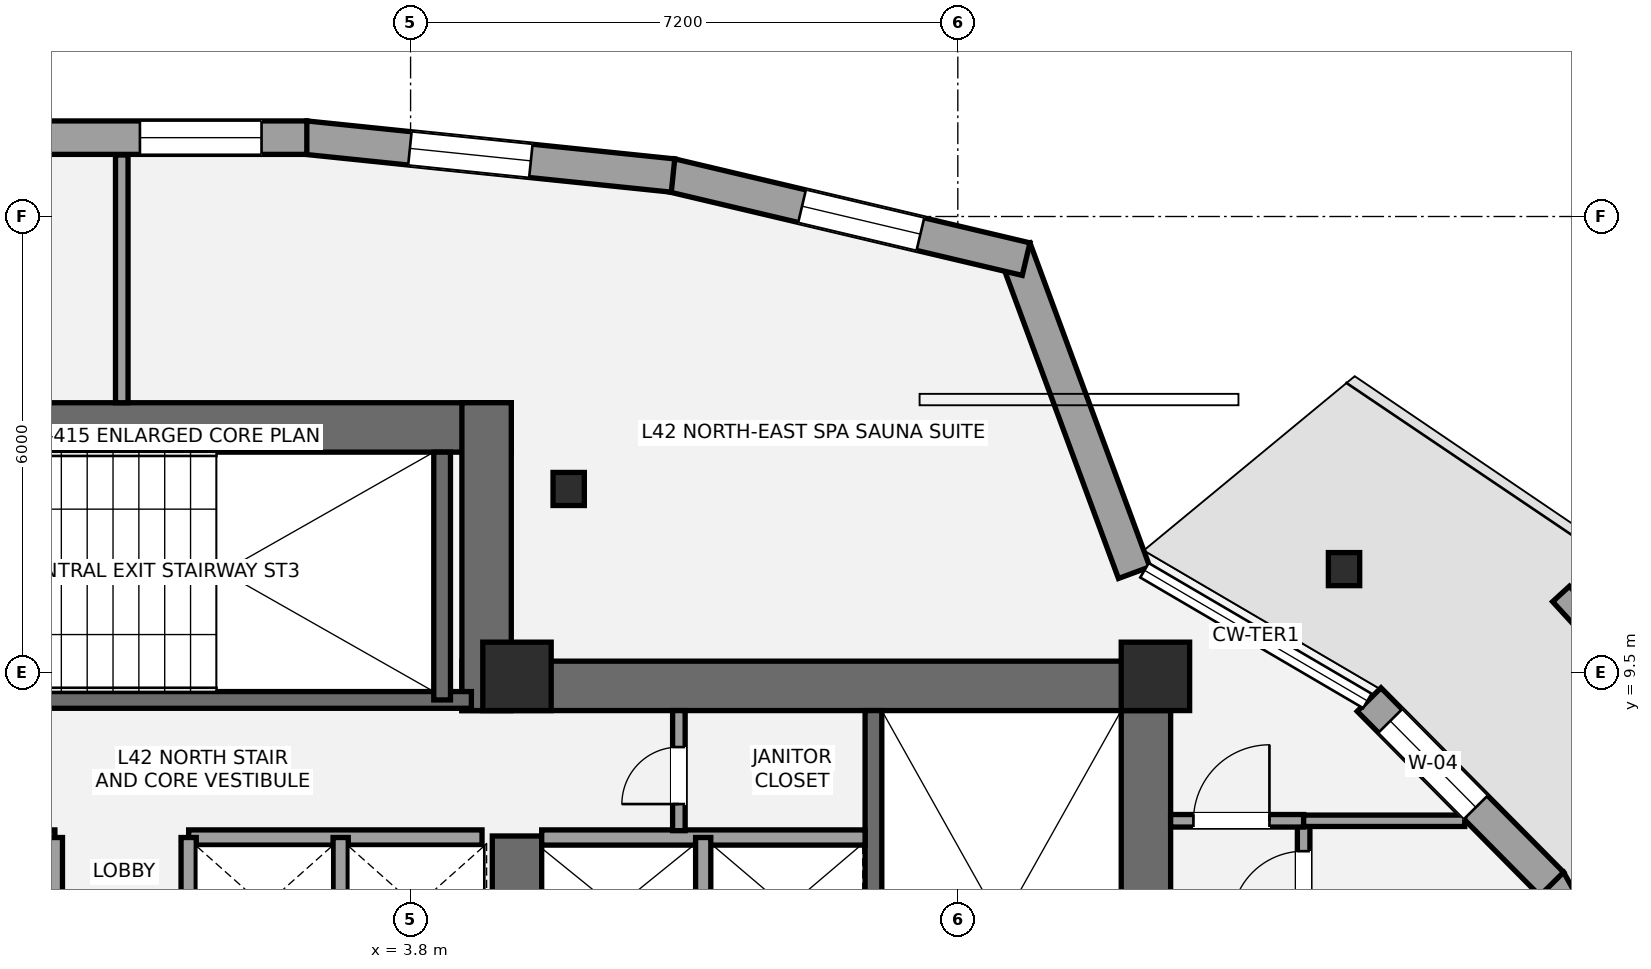
"""IFC4 building model, lengths in metres.
Left out: names, types, materials, properties, quantities, classifications, styles, units other than length and angle.
Written with IfcOpenShell. Run it as: python <this file> out.ifc"""

import sys

from ifc_helpers import new_model, si_unit, direction, frame, frame_2d, origin, origin_2d, place, context, subcontext, project, spatial, rectangle, i_section, extrude, element, fill, save


model = new_model("IFC4")
c1 = context("Model", 3, precision=1e-05, world=origin(), true_north=direction((0.0, 1.0)))
c2 = subcontext(c1, "Body", "Model", "MODEL_VIEW")
j1 = project(units=[si_unit("LENGTHUNIT", "METRE"), si_unit("PLANEANGLEUNIT", "RADIAN")], contexts=[c1])
p1 = place(None, origin())
s1 = spatial("IfcSite", under=j1, at=p1, CompositionType="ELEMENT")
p2 = place(p1, origin())
s2 = spatial("IfcBuilding", under=s1, at=p2, CompositionType="ELEMENT")
p3 = place(p2, frame((0.0, 0.0, 156.6)))
s3 = spatial("IfcBuildingStorey", under=s2, at=p3, CompositionType="ELEMENT", Elevation=156.6)
p4 = place(p3, frame((13.475, 1.2, 0.0), z_axis=(0.0, 0.0, 1.0), x_axis=(0.0, 1.0, 0.0)))
e1 = element("IfcWall", 1, at=p4, inside=s3, PredefinedType="SHEAR", context=c2, shape_type="SweptSolid", body=[
    extrude(rectangle(XDim=8.45, YDim=0.65, at=frame_2d((4.225, 0.0))), origin(), (0.0, 0.0, 1.0), 3.2),
])
p5 = place(p3, frame((4.475, 9.325, 0.0), z_axis=(0.0, 0.0, 1.0), x_axis=(1.0, 0.0, 0.0)))
e2 = element("IfcWall", 2, at=p5, inside=s3, PredefinedType="SHEAR", context=c2, shape_type="SweptSolid", body=[
    extrude(rectangle(XDim=9.325, YDim=0.65, at=frame_2d((4.663, 0.0))), origin(), (0.0, 0.0, 1.0), 3.2),
])
p6 = place(p3, frame((5.2, 5.35, 0.0), z_axis=(0.0, 0.0, 1.0), x_axis=(0.0, 1.0, 0.0)))
e3 = element("IfcWall", 3, at=p6, inside=s3, PredefinedType="SHEAR", context=c2, shape_type="SweptSolid", body=[
    extrude(rectangle(XDim=2.0, YDim=0.65, at=frame_2d((1.0, 0.0))), origin(), (0.0, 0.0, 1.0), 3.2),
])
p7 = place(p3, frame((9.89, 1.85, 0.0), z_axis=(0.0, 0.0, 1.0), x_axis=(0.0, 1.0, 0.0)))
e4 = element("IfcWall", 4, at=p7, inside=s3, PredefinedType="SHEAR", context=c2, shape_type="SweptSolid", body=[
    extrude(rectangle(XDim=7.15, YDim=0.22, at=frame_2d((3.575, 0.0))), origin(), (0.0, 0.0, 1.0), 3.2),
])
p8 = place(p3, frame((-5.125, 12.725, 0.0), z_axis=(0.0, 0.0, 1.0), x_axis=(1.0, 0.0, 0.0)))
e5 = element("IfcWall", 5, at=p8, inside=s3, PredefinedType="SHEAR", context=c2, shape_type="SweptSolid", body=[
    extrude(rectangle(XDim=10.25, YDim=0.65, at=frame_2d((5.125, 0.0))), origin(), (0.0, 0.0, 1.0), 3.2),
])
p9 = place(p3, frame((4.8, 9.0, 0.0), z_axis=(0.0, 0.0, 1.0), x_axis=(0.0, 1.0, 0.0)))
e6 = element("IfcWall", 6, at=p9, inside=s3, PredefinedType="SHEAR", context=c2, shape_type="SweptSolid", body=[
    extrude(rectangle(XDim=4.05, YDim=0.65, at=frame_2d((2.025, 0.0))), origin(), (0.0, 0.0, 1.0), 3.2),
])
p10 = place(p3, frame((-4.7, 9.14, 0.0), z_axis=(0.0, 0.0, 1.0), x_axis=(1.0, 0.0, 0.0)))
e7 = element("IfcWall", 7, at=p10, inside=s3, PredefinedType="SHEAR", context=c2, shape_type="SweptSolid", body=[
    extrude(rectangle(XDim=9.3, YDim=0.22, at=frame_2d((4.65, 0.0))), origin(), (0.0, 0.0, 1.0), 3.2),
])
p11 = place(p10, frame((1.15, 0.0, 0.0)))
e8 = element("IfcOpeningElement", 8, at=p11, cuts=e7, PredefinedType="OPENING", context=c2, shape_type="SweptSolid", body=[
    extrude(rectangle(XDim=1.05, YDim=2.15, at=frame_2d((0.525, 1.075))), frame((0.0, 0.12, 0.0), z_axis=(0.0, -1.0, 0.0), x_axis=(1.0, 0.0, 0.0)), (0.0, 0.0, 1.0), 0.24),
])
p12 = place(p3, frame((4.215, 9.14, 0.0), z_axis=(0.0, 0.0, 1.0), x_axis=(0.0, 1.0, 0.0)))
e9 = element("IfcWall", 9, at=p12, inside=s3, PredefinedType="SHEAR", context=c2, shape_type="SweptSolid", body=[
    extrude(rectangle(XDim=3.26, YDim=0.22, at=frame_2d((1.63, 0.0))), origin(), (0.0, 0.0, 1.0), 3.2),
])
for number, where, z_axis, x_axis in (
    (10, (5.2, 9.45, 0.0), (0.0, 0.0, 1.0), (1.0, 0.0, 0.0)),
    (11, (13.6, 9.45, 0.0), (0.0, 0.0, 1.0), (1.0, 0.0, 0.0)),
):
    element("IfcColumn", number, at=place(p3, frame(where, z_axis=z_axis, x_axis=x_axis)), inside=s3, PredefinedType="COLUMN", context=c2, shape_type="SweptSolid", body=[
        extrude(rectangle(XDim=0.9, YDim=0.9, at=origin_2d()), origin(), (0.0, 0.0, 1.0), 3.2),
    ])
for number, where, z_axis, x_axis in (
    (12, (16.082, 10.861, 0.0), (0.0, 0.0, 1.0), (1.0, 0.0, 0.0)),
    (13, (5.88, 11.915, 0.0), (0.0, 0.0, 1.0), (1.0, 0.0, 0.0)),
):
    element("IfcColumn", number, at=place(p3, frame(where, z_axis=z_axis, x_axis=x_axis)), inside=s3, PredefinedType="COLUMN", context=c2, shape_type="SweptSolid", body=[
        extrude(i_section(OverallWidth=0.412, OverallDepth=0.435, WebThickness=0.036, FlangeThickness=0.057, at=origin_2d()), origin(), (0.0, 0.0, 1.0), 3.2),
    ])
p13 = place(p3, frame((18.778, 6.766, 0.0), z_axis=(0.0, 0.0, 1.0), x_axis=(0.487244227645, -0.873265745708, 0.0)))
e14 = element("IfcWall", 14, at=p13, inside=s3, PredefinedType="STANDARD", context=c2, shape_type="SweptSolid", body=[
    extrude(rectangle(XDim=3.053, YDim=0.44, at=frame_2d((1.527, 0.0))), origin(), (0.0, 0.0, 1.0), 2.319),
])
p14 = place(p13, frame((0.977, 0.0, 0.0)))
e15 = element("IfcOpeningElement", 15, at=p14, cuts=e14, PredefinedType="OPENING", context=c2, shape_type="SweptSolid", body=[
    extrude(rectangle(XDim=1.1, YDim=2.15, at=frame_2d((0.55, 1.075))), frame((0.0, 0.23, 0.0), z_axis=(0.0, -1.0, 0.0), x_axis=(1.0, 0.0, 0.0)), (0.0, 0.0, 1.0), 0.46),
])
p15 = place(p3, frame((16.412, 9.145, 0.0), z_axis=(0.0, 0.0, 1.0), x_axis=(0.703666281918, -0.71053062122, 0.0)))
e16 = element("IfcWall", 16, at=p15, inside=s3, PredefinedType="STANDARD", context=c2, shape_type="SweptSolid", body=[
    extrude(rectangle(XDim=3.414, YDim=0.44, at=frame_2d((1.707, 0.0))), origin(), (0.0, 0.0, 1.0), 2.319),
])
p16 = place(p15, frame((0.395, 0.0, 0.58)))
e17 = element("IfcOpeningElement", 17, at=p16, cuts=e16, PredefinedType="OPENING", context=c2, shape_type="SweptSolid", body=[
    extrude(rectangle(XDim=1.6, YDim=1.55, at=frame_2d((0.8, 0.775))), frame((0.0, 0.23, 0.0), z_axis=(0.0, -1.0, 0.0), x_axis=(1.0, 0.0, 0.0)), (0.0, 0.0, 1.0), 0.46),
])
p17 = place(p3, frame((11.743, 15.077, 0.0), z_axis=(0.0, 0.0, 1.0), x_axis=(0.347029196507, -0.937854325987, 0.0)))
e18 = element("IfcWall", 18, at=p17, inside=s3, PredefinedType="STANDARD", context=c2, shape_type="SweptSolid", body=[
    extrude(rectangle(XDim=4.545, YDim=0.44, at=frame_2d((2.273, 0.0))), origin(), (0.0, 0.0, 1.0), 2.315),
])
p18 = place(p3, frame((7.225, 16.044, 0.0), z_axis=(0.0, 0.0, 1.0), x_axis=(0.973201371538, -0.229954539936, 0.0)))
e19 = element("IfcWall", 19, at=p18, inside=s3, PredefinedType="STANDARD", context=c2, shape_type="SweptSolid", body=[
    extrude(rectangle(XDim=4.802, YDim=0.44, at=frame_2d((2.401, 0.0))), origin(), (0.0, 0.0, 1.0), 2.315),
])
p19 = place(p18, frame((1.773, 0.0, 0.58)))
e20 = element("IfcOpeningElement", 20, at=p19, cuts=e19, PredefinedType="OPENING", context=c2, shape_type="SweptSolid", body=[
    extrude(rectangle(XDim=1.6, YDim=1.55, at=frame_2d((0.8, 0.775))), frame((0.0, 0.23, 0.0), z_axis=(0.0, -1.0, 0.0), x_axis=(1.0, 0.0, 0.0)), (0.0, 0.0, 1.0), 0.46),
])
p20 = place(p3, frame((2.412, 16.539, 0.0), z_axis=(0.0, 0.0, 1.0), x_axis=(0.994718319881, -0.10264240884, 0.0)))
e21 = element("IfcWall", 21, at=p20, inside=s3, PredefinedType="STANDARD", context=c2, shape_type="SweptSolid", body=[
    extrude(rectangle(XDim=4.866, YDim=0.44, at=frame_2d((2.433, 0.0))), origin(), (0.0, 0.0, 1.0), 2.315),
])
p21 = place(p20, frame((1.386, 0.0, 0.58)))
e22 = element("IfcOpeningElement", 22, at=p21, cuts=e21, PredefinedType="OPENING", context=c2, shape_type="SweptSolid", body=[
    extrude(rectangle(XDim=1.6, YDim=1.55, at=frame_2d((0.8, 0.775))), frame((0.0, 0.23, 0.0), z_axis=(0.0, -1.0, 0.0), x_axis=(1.0, 0.0, 0.0)), (0.0, 0.0, 1.0), 0.46),
])
p22 = place(p3, frame((-2.435, 16.537, 0.0), z_axis=(0.0, 0.0, 1.0), x_axis=(1.0, 0.0, 0.0)))
e23 = element("IfcWall", 23, at=p22, inside=s3, PredefinedType="STANDARD", context=c2, shape_type="SweptSolid", body=[
    extrude(rectangle(XDim=4.87, YDim=0.44, at=frame_2d((2.435, 0.0))), origin(), (0.0, 0.0, 1.0), 2.315),
])
p23 = place(p22, frame((2.674, 0.0, 0.58)))
e24 = element("IfcOpeningElement", 24, at=p23, cuts=e23, PredefinedType="OPENING", context=c2, shape_type="SweptSolid", body=[
    extrude(rectangle(XDim=1.6, YDim=1.55, at=frame_2d((0.8, 0.775))), frame((0.0, 0.23, 0.0), z_axis=(0.0, -1.0, 0.0), x_axis=(1.0, 0.0, 0.0)), (0.0, 0.0, 1.0), 0.46),
])
p24 = place(p3, frame((21.462, 7.776, 0.0), z_axis=(0.0, 0.0, 1.0), x_axis=(-0.675281078683, 0.737560482112, 0.0)))
e25 = element("IfcWall", 25, at=p24, inside=s3, PredefinedType="PARAPET", context=c2, shape_type="SweptSolid", body=[
    extrude(rectangle(XDim=3.74, YDim=0.3, at=frame_2d((1.87, 0.0))), origin(), (0.0, 0.0, 1.0), 0.45),
])
p25 = place(p3, frame((5.525, 7.33, 0.0), z_axis=(0.0, 0.0, 1.0), x_axis=(1.0, 0.0, 0.0)))
e26 = element("IfcWall", 26, at=p25, inside=s3, PredefinedType="SOLIDWALL", context=c2, shape_type="SweptSolid", body=[
    extrude(rectangle(XDim=4.255, YDim=0.2, at=frame_2d((2.127, 0.0))), origin(), (0.0, 0.0, 1.0), 3.02),
])
p26 = place(p3, frame((7.65, 5.47, 0.0), z_axis=(0.0, 0.0, 1.0), x_axis=(0.0, 1.0, 0.0)))
e27 = element("IfcWall", 27, at=p26, inside=s3, PredefinedType="SOLIDWALL", context=c2, shape_type="SweptSolid", body=[
    extrude(rectangle(XDim=1.86, YDim=0.2, at=frame_2d((0.93, 0.0))), origin(), (0.0, 0.0, 1.0), 3.02),
])
for number, where, z_axis, x_axis in (
    (28, (-4.74, 7.33, 0.0), (0.0, 0.0, 1.0), (1.0, 0.0, 0.0)),
    (29, (0.88, 7.33, 0.0), (0.0, 0.0, 1.0), (1.0, 0.0, 0.0)),
):
    element("IfcWall", number, at=place(p3, frame(where, z_axis=z_axis, x_axis=x_axis)), inside=s3, PredefinedType="SOLIDWALL", context=c2, shape_type="SweptSolid", body=[
        extrude(rectangle(XDim=3.86, YDim=0.2, at=frame_2d((1.93, 0.0))), origin(), (0.0, 0.0, 1.0), 3.02),
    ])
for number, where, z_axis, x_axis in (
    (30, (2.88, 5.52, 0.0), (0.0, 0.0, 1.0), (0.0, 1.0, 0.0)),
    (31, (-0.88, 5.52, 0.0), (0.0, 0.0, 1.0), (0.0, 1.0, 0.0)),
    (32, (0.88, 5.52, 0.0), (0.0, 0.0, 1.0), (0.0, 1.0, 0.0)),
):
    element("IfcWall", number, at=place(p3, frame(where, z_axis=z_axis, x_axis=x_axis)), inside=s3, PredefinedType="SOLIDWALL", context=c2, shape_type="SweptSolid", body=[
        extrude(rectangle(XDim=1.81, YDim=0.2, at=frame_2d((0.905, 0.0))), origin(), (0.0, 0.0, 1.0), 3.02),
    ])
p27 = place(p3, frame((7.33, 7.42, 0.0), z_axis=(0.0, 0.0, 1.0), x_axis=(0.0, 1.0, 0.0)))
e33 = element("IfcWall", 33, at=p27, inside=s3, PredefinedType="PARTITIONING", context=c2, shape_type="SweptSolid", body=[
    extrude(rectangle(XDim=1.58, YDim=0.165, at=frame_2d((0.79, 0.0))), origin(), (0.0, 0.0, 1.0), 3.02),
])
p28 = place(p27, frame((0.35, 0.0, 0.0)))
e34 = element("IfcOpeningElement", 34, at=p28, cuts=e33, PredefinedType="OPENING", context=c2, shape_type="SweptSolid", body=[
    extrude(rectangle(XDim=0.75, YDim=2.1, at=frame_2d((0.375, 1.05))), frame((0.0, 0.093, 0.0), z_axis=(0.0, -1.0, 0.0), x_axis=(1.0, 0.0, 0.0)), (0.0, 0.0, 1.0), 0.185),
])
p29 = place(p3, frame((15.55, -13.191, 0.0), z_axis=(0.0, 0.0, 1.0), x_axis=(0.0, 1.0, 0.0)))
e35 = element("IfcWall", 35, at=p29, inside=s3, PredefinedType="PARTITIONING", context=c2, shape_type="SweptSolid", body=[
    extrude(rectangle(XDim=20.741, YDim=0.165, at=frame_2d((10.37, 0.0))), origin(), (0.0, 0.0, 1.0), 2.473),
])
p30 = place(p29, frame((5.641, 0.0, 0.0)))
e36 = element("IfcOpeningElement", 36, at=p30, cuts=e35, PredefinedType="OPENING", context=c2, shape_type="SweptSolid", body=[
    extrude(rectangle(XDim=0.85, YDim=2.1, at=frame_2d((0.425, 1.05))), frame((0.0, 0.093, 0.0), z_axis=(0.0, -1.0, 0.0), x_axis=(1.0, 0.0, 0.0)), (0.0, 0.0, 1.0), 0.185),
])
p31 = place(p29, frame((13.641, 0.0, 0.0)))
e37 = element("IfcOpeningElement", 37, at=p31, cuts=e35, PredefinedType="OPENING", context=c2, shape_type="SweptSolid", body=[
    extrude(rectangle(XDim=0.95, YDim=2.15, at=frame_2d((0.475, 1.075))), frame((0.0, 0.093, 0.0), z_axis=(0.0, -1.0, 0.0), x_axis=(1.0, 0.0, 0.0)), (0.0, 0.0, 1.0), 0.185),
])
p32 = place(p29, frame((19.391, 0.0, 0.0)))
e38 = element("IfcOpeningElement", 38, at=p32, cuts=e35, PredefinedType="OPENING", context=c2, shape_type="SweptSolid", body=[
    extrude(rectangle(XDim=0.95, YDim=2.15, at=frame_2d((0.475, 1.075))), frame((0.0, 0.093, 0.0), z_axis=(0.0, -1.0, 0.0), x_axis=(1.0, 0.0, 0.0)), (0.0, 0.0, 1.0), 0.185),
])
p33 = place(p3, frame((13.8, 7.55, 0.0), z_axis=(0.0, 0.0, 1.0), x_axis=(1.0, 0.0, 0.0)))
e39 = element("IfcWall", 39, at=p33, inside=s3, PredefinedType="PARTITIONING", context=c2, shape_type="SweptSolid", body=[
    extrude(rectangle(XDim=1.75, YDim=0.165, at=frame_2d((0.875, 0.0))), origin(), (0.0, 0.0, 1.0), 2.473),
])
p34 = place(p33, frame((0.3, 0.0, 0.0)))
e40 = element("IfcOpeningElement", 40, at=p34, cuts=e39, PredefinedType="OPENING", context=c2, shape_type="SweptSolid", body=[
    extrude(rectangle(XDim=1.0, YDim=2.15, at=frame_2d((0.5, 1.075))), frame((0.0, 0.093, 0.0), z_axis=(0.0, -1.0, 0.0), x_axis=(1.0, 0.0, 0.0)), (0.0, 0.0, 1.0), 0.185),
])
p35 = place(p3, frame((15.55, 7.55, 0.0), z_axis=(0.0, 0.0, 1.0), x_axis=(1.0, 0.0, 0.0)))
e41 = element("IfcWall", 41, at=p35, inside=s3, PredefinedType="PLUMBINGWALL", context=c2, shape_type="SweptSolid", body=[
    extrude(rectangle(XDim=2.12, YDim=0.15, at=frame_2d((1.06, 0.0))), origin(), (0.0, 0.0, 1.0), 2.473),
])
p36 = place(p3, frame((0.0, 13.05, 0.0), z_axis=(0.0, 0.0, 1.0), x_axis=(0.0, 1.0, 0.0)))
e42 = element("IfcWall", 42, at=p36, inside=s3, PredefinedType="PARTITIONING", context=c2, shape_type="SweptSolid", body=[
    extrude(rectangle(XDim=3.259, YDim=0.165, at=frame_2d((1.63, 0.0))), origin(), (0.0, 0.0, 1.0), 3.02),
])
p37 = place(p16, origin())
e43 = element("IfcWindow", 43, at=p37, inside=s3, PartitioningType="SINGLE_PANEL", PredefinedType="WINDOW", context=c2, shape_type="SweptSolid", body=[
    extrude(rectangle(XDim=1.6, YDim=1.55, at=frame_2d((0.8, 0.775))), frame((0.0, -0.01, 0.0), z_axis=(0.0, -1.0, 0.0), x_axis=(1.0, 0.0, 0.0)), (0.0, 0.0, 1.0), 0.06),
])
fill(e17, e43)
p38 = place(p19, origin())
e44 = element("IfcWindow", 44, at=p38, inside=s3, PartitioningType="SINGLE_PANEL", PredefinedType="WINDOW", context=c2, shape_type="SweptSolid", body=[
    extrude(rectangle(XDim=1.6, YDim=1.55, at=frame_2d((0.8, 0.775))), frame((0.0, -0.01, 0.0), z_axis=(0.0, -1.0, 0.0), x_axis=(1.0, 0.0, 0.0)), (0.0, 0.0, 1.0), 0.06),
])
fill(e20, e44)
p39 = place(p21, origin())
e45 = element("IfcWindow", 45, at=p39, inside=s3, PartitioningType="SINGLE_PANEL", PredefinedType="WINDOW", context=c2, shape_type="SweptSolid", body=[
    extrude(rectangle(XDim=1.6, YDim=1.55, at=frame_2d((0.8, 0.775))), frame((0.0, -0.01, 0.0), z_axis=(0.0, -1.0, 0.0), x_axis=(1.0, 0.0, 0.0)), (0.0, 0.0, 1.0), 0.06),
])
fill(e22, e45)
p40 = place(p23, origin())
e46 = element("IfcWindow", 46, at=p40, inside=s3, PartitioningType="SINGLE_PANEL", PredefinedType="WINDOW", context=c2, shape_type="SweptSolid", body=[
    extrude(rectangle(XDim=1.6, YDim=1.55, at=frame_2d((0.8, 0.775))), frame((0.0, -0.01, 0.0), z_axis=(0.0, -1.0, 0.0), x_axis=(1.0, 0.0, 0.0)), (0.0, 0.0, 1.0), 0.06),
])
fill(e24, e46)
p41 = place(p28, origin())
e47 = element("IfcDoor", 47, at=p41, inside=s3, OperationType="SINGLE_SWING_LEFT", PredefinedType="DOOR", context=c2, shape_type="SweptSolid", body=[
    extrude(rectangle(XDim=0.75, YDim=2.1, at=frame_2d((0.375, 1.05))), frame((0.0, 0.025, 0.0), z_axis=(0.0, -1.0, 0.0), x_axis=(1.0, 0.0, 0.0)), (0.0, 0.0, 1.0), 0.05),
])
fill(e34, e47)
p42 = place(p34, origin())
e48 = element("IfcDoor", 48, at=p42, inside=s3, OperationType="SINGLE_SWING_RIGHT", PredefinedType="DOOR", context=c2, shape_type="SweptSolid", body=[
    extrude(rectangle(XDim=1.0, YDim=2.15, at=frame_2d((0.5, 1.075))), frame((0.0, 0.025, 0.0), z_axis=(0.0, -1.0, 0.0), x_axis=(1.0, 0.0, 0.0)), (0.0, 0.0, 1.0), 0.05),
])
fill(e40, e48)
p43 = place(p32, origin())
e49 = element("IfcDoor", 49, at=p43, inside=s3, OperationType="SINGLE_SWING_LEFT", PredefinedType="DOOR", context=c2, shape_type="SweptSolid", body=[
    extrude(rectangle(XDim=0.95, YDim=2.15, at=frame_2d((0.475, 1.075))), frame((0.0, 0.025, 0.0), z_axis=(0.0, -1.0, 0.0), x_axis=(1.0, 0.0, 0.0)), (0.0, 0.0, 1.0), 0.05),
])
fill(e38, e49)
save(model, sys.argv[1])
